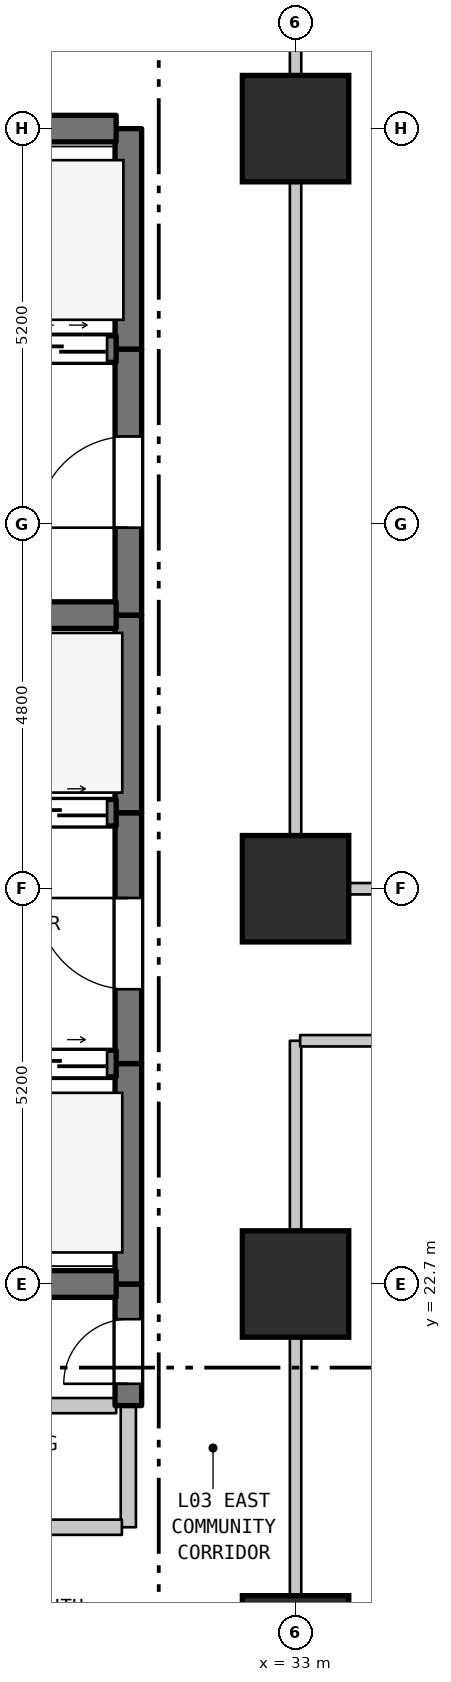
"""IFC4 building model, lengths in metres.
Left out: names, types, materials, properties, quantities, classifications, styles, units other than length and angle.
Written with IfcOpenShell. Run it as: python <this file> out.ifc"""

import sys

from ifc_helpers import new_model, si_unit, direction, frame, frame_2d, origin, origin_2d, place, context, subcontext, project, spatial, rectangle, extrude, element, fill, save


model = new_model("IFC4")
c1 = context("Model", 3, precision=1e-05, world=origin(), true_north=direction((0.0, 1.0)))
c2 = subcontext(c1, "Body", "Model", "MODEL_VIEW")
j1 = project(units=[si_unit("LENGTHUNIT", "METRE"), si_unit("PLANEANGLEUNIT", "RADIAN")], contexts=[c1])
p1 = place(None, origin())
s1 = spatial("IfcSite", under=j1, at=p1, CompositionType="ELEMENT")
p2 = place(p1, origin())
s2 = spatial("IfcBuilding", under=s1, at=p2, CompositionType="ELEMENT")
p3 = place(p2, frame((0.0, 0.0, 19.0)))
s3 = spatial("IfcBuildingStorey", under=s2, at=p3, CompositionType="ELEMENT", Elevation=19.0)
for number, where, z_axis, x_axis in (
    (1, (33.0, 17.9, 0.0), (0.0, 0.0, 1.0), (1.0, 0.0, 0.0)),
    (2, (33.0, 22.7, 0.0), (0.0, 0.0, 1.0), (1.0, 0.0, 0.0)),
    (3, (33.0, 27.9, 0.0), (0.0, 0.0, 1.0), (1.0, 0.0, 0.0)),
    (4, (33.0, 37.9, 0.0), (0.0, 0.0, 1.0), (1.0, 0.0, 0.0)),
):
    element("IfcColumn", number, at=place(p3, frame(where, z_axis=z_axis, x_axis=x_axis)), inside=s3, PredefinedType="COLUMN", context=c2, shape_type="SweptSolid", body=[
        extrude(rectangle(XDim=1.4, YDim=1.4, at=origin_2d()), origin(), (0.0, 0.0, 1.0), 5.0),
    ])
p4 = place(p3, frame((30.8, 19.5, 0.0), z_axis=(0.0, 0.0, 1.0), x_axis=(0.0, 1.0, 0.0)))
e5 = element("IfcWall", 5, at=p4, inside=s3, PredefinedType="STANDARD", context=c2, shape_type="SweptSolid", body=[
    extrude(rectangle(XDim=1.6, YDim=0.2, at=frame_2d((0.8, 0.0))), origin(), (0.0, 0.0, 1.0), 4.685),
])
p5 = place(p3, frame((30.8, 21.1, 0.0), z_axis=(0.0, 0.0, 1.0), x_axis=(0.0, 1.0, 0.0)))
e6 = element("IfcWall", 6, at=p5, inside=s3, PredefinedType="SHEAR", context=c2, shape_type="SweptSolid", body=[
    extrude(rectangle(XDim=1.6, YDim=0.35, at=frame_2d((0.8, 0.0))), origin(), (0.0, 0.0, 1.0), 4.685),
])
p6 = place(p5, frame((0.287, 0.0, 0.0)))
e7 = element("IfcOpeningElement", 7, at=p6, cuts=e6, PredefinedType="OPENING", context=c2, shape_type="SweptSolid", body=[
    extrude(rectangle(XDim=0.85, YDim=2.1, at=frame_2d((0.425, 1.05))), frame((0.0, 0.185, 0.0), z_axis=(0.0, -1.0, 0.0), x_axis=(1.0, 0.0, 0.0)), (0.0, 0.0, 1.0), 0.37),
])
p7 = place(p3, frame((30.8, 22.7, 0.0), z_axis=(0.0, 0.0, 1.0), x_axis=(0.0, 1.0, 0.0)))
e8 = element("IfcWall", 8, at=p7, inside=s3, PredefinedType="SHEAR", context=c2, shape_type="SweptSolid", body=[
    extrude(rectangle(XDim=2.9, YDim=0.35, at=frame_2d((1.45, 0.0))), origin(), (0.0, 0.0, 1.0), 4.685),
])
p8 = place(p3, frame((30.8, 25.6, 0.0), z_axis=(0.0, 0.0, 1.0), x_axis=(0.0, 1.0, 0.0)))
e9 = element("IfcWall", 9, at=p8, inside=s3, PredefinedType="SHEAR", context=c2, shape_type="SweptSolid", body=[
    extrude(rectangle(XDim=3.3, YDim=0.35, at=frame_2d((1.65, 0.0))), origin(), (0.0, 0.0, 1.0), 4.685),
])
p9 = place(p8, frame((0.978, 0.0, 0.0)))
e10 = element("IfcOpeningElement", 10, at=p9, cuts=e9, PredefinedType="OPENING", context=c2, shape_type="SweptSolid", body=[
    extrude(rectangle(XDim=1.2, YDim=2.2, at=frame_2d((0.6, 1.1))), frame((0.0, 0.185, 0.0), z_axis=(0.0, -1.0, 0.0), x_axis=(1.0, 0.0, 0.0)), (0.0, 0.0, 1.0), 0.37),
])
p10 = place(p3, frame((30.8, 28.9, 0.0), z_axis=(0.0, 0.0, 1.0), x_axis=(0.0, 1.0, 0.0)))
e11 = element("IfcWall", 11, at=p10, inside=s3, PredefinedType="SHEAR", context=c2, shape_type="SweptSolid", body=[
    extrude(rectangle(XDim=2.6, YDim=0.35, at=frame_2d((1.3, 0.0))), origin(), (0.0, 0.0, 1.0), 4.685),
])
p11 = place(p3, frame((30.8, 31.5, 0.0), z_axis=(0.0, 0.0, 1.0), x_axis=(0.0, 1.0, 0.0)))
e12 = element("IfcWall", 12, at=p11, inside=s3, PredefinedType="SHEAR", context=c2, shape_type="SweptSolid", body=[
    extrude(rectangle(XDim=3.5, YDim=0.35, at=frame_2d((1.75, 0.0))), origin(), (0.0, 0.0, 1.0), 4.685),
])
p12 = place(p11, frame((1.15, 0.0, 0.0)))
e13 = element("IfcOpeningElement", 13, at=p12, cuts=e12, PredefinedType="OPENING", context=c2, shape_type="SweptSolid", body=[
    extrude(rectangle(XDim=1.2, YDim=2.2, at=frame_2d((0.6, 1.1))), frame((0.0, 0.185, 0.0), z_axis=(0.0, -1.0, 0.0), x_axis=(1.0, 0.0, 0.0)), (0.0, 0.0, 1.0), 0.37),
])
p13 = place(p3, frame((30.8, 35.0, 0.0), z_axis=(0.0, 0.0, 1.0), x_axis=(0.0, 1.0, 0.0)))
e14 = element("IfcWall", 14, at=p13, inside=s3, PredefinedType="SHEAR", context=c2, shape_type="SweptSolid", body=[
    extrude(rectangle(XDim=2.9, YDim=0.35, at=frame_2d((1.45, 0.0))), origin(), (0.0, 0.0, 1.0), 4.685),
])
p14 = place(p3, frame((33.0, 6.7, 0.0), z_axis=(0.0, 0.0, 1.0), x_axis=(0.0, 1.0, 0.0)))
e15 = element("IfcWall", 15, at=p14, inside=s3, PredefinedType="STANDARD", context=c2, shape_type="SweptSolid", body=[
    extrude(rectangle(XDim=19.2, YDim=0.15, at=frame_2d((9.6, 0.0))), origin(), (0.0, 0.0, 1.0), 4.185),
])
p15 = place(p3, frame((33.0, 27.9, 0.0), z_axis=(0.0, 0.0, 1.0), x_axis=(0.0, 1.0, 0.0)))
e16 = element("IfcWall", 16, at=p15, inside=s3, PredefinedType="STANDARD", context=c2, shape_type="SweptSolid", body=[
    extrude(rectangle(XDim=10.0, YDim=0.15, at=frame_2d((5.0, 0.0))), origin(), (0.0, 0.0, 1.0), 4.185),
])
p16 = place(p3, frame((27.285, 19.5, 0.0), z_axis=(0.0, 0.0, 1.0), x_axis=(1.0, 0.0, 0.0)))
e17 = element("IfcWall", 17, at=p16, inside=s3, PredefinedType="STANDARD", context=c2, shape_type="SweptSolid", body=[
    extrude(rectangle(XDim=3.43, YDim=0.2, at=frame_2d((1.715, 0.0))), origin(), (0.0, 0.0, 1.0), 4.685),
])
p17 = place(p16, frame((1.192, 0.0, 0.0)))
e18 = element("IfcOpeningElement", 18, at=p17, cuts=e17, PredefinedType="OPENING", context=c2, shape_type="SweptSolid", body=[
    extrude(rectangle(XDim=0.9, YDim=2.15, at=frame_2d((0.45, 1.075))), frame((0.0, 0.11, 0.0), z_axis=(0.0, -1.0, 0.0), x_axis=(1.0, 0.0, 0.0)), (0.0, 0.0, 1.0), 0.22),
])
p18 = place(p3, frame((27.285, 21.1, 0.0), z_axis=(0.0, 0.0, 1.0), x_axis=(1.0, 0.0, 0.0)))
e19 = element("IfcWall", 19, at=p18, inside=s3, PredefinedType="STANDARD", context=c2, shape_type="SweptSolid", body=[
    extrude(rectangle(XDim=3.355, YDim=0.2, at=frame_2d((1.677, 0.0))), origin(), (0.0, 0.0, 1.0), 4.685),
])
p19 = place(p3, frame((27.46, 22.7, 0.0), z_axis=(0.0, 0.0, 1.0), x_axis=(1.0, 0.0, 0.0)))
e20 = element("IfcWall", 20, at=p19, inside=s3, PredefinedType="SHEAR", context=c2, shape_type="SweptSolid", body=[
    extrude(rectangle(XDim=3.18, YDim=0.35, at=frame_2d((1.59, 0.0))), origin(), (0.0, 0.0, 1.0), 4.685),
])
p20 = place(p3, frame((27.46, 25.6, 0.0), z_axis=(0.0, 0.0, 1.0), x_axis=(1.0, 0.0, 0.0)))
e21 = element("IfcWall", 21, at=p20, inside=s3, PredefinedType="SHEAR", context=c2, shape_type="SweptSolid", body=[
    extrude(rectangle(XDim=3.18, YDim=0.35, at=frame_2d((1.59, 0.0))), origin(), (0.0, 0.0, 1.0), 4.685),
])
p21 = place(p20, frame((0.12, 0.0, 0.0)))
e22 = element("IfcOpeningElement", 22, at=p21, cuts=e21, PredefinedType="OPENING", context=c2, shape_type="SweptSolid", body=[
    extrude(rectangle(XDim=1.25, YDim=2.2, at=frame_2d((0.625, 1.1))), frame((0.0, 0.185, 0.0), z_axis=(0.0, -1.0, 0.0), x_axis=(1.0, 0.0, 0.0)), (0.0, 0.0, 1.0), 0.37),
])
p22 = place(p20, frame((1.81, 0.0, 0.0)))
e23 = element("IfcOpeningElement", 23, at=p22, cuts=e21, PredefinedType="OPENING", context=c2, shape_type="SweptSolid", body=[
    extrude(rectangle(XDim=1.25, YDim=2.2, at=frame_2d((0.625, 1.1))), frame((0.0, 0.185, 0.0), z_axis=(0.0, -1.0, 0.0), x_axis=(1.0, 0.0, 0.0)), (0.0, 0.0, 1.0), 0.37),
])
p23 = place(p3, frame((33.06, 25.9, 0.0), z_axis=(0.0, 0.0, 1.0), x_axis=(1.0, 0.0, 0.0)))
e24 = element("IfcWall", 24, at=p23, inside=s3, PredefinedType="STANDARD", context=c2, shape_type="SweptSolid", body=[
    extrude(rectangle(XDim=23.94, YDim=0.15, at=frame_2d((11.97, 0.0))), origin(), (0.0, 0.0, 1.0), 4.685),
])
p24 = place(p23, frame((8.77, 0.0, 0.0)))
e25 = element("IfcOpeningElement", 25, at=p24, cuts=e24, PredefinedType="OPENING", context=c2, shape_type="SweptSolid", body=[
    extrude(rectangle(XDim=1.2, YDim=2.2, at=frame_2d((0.6, 1.1))), frame((0.0, 0.085, 0.0), z_axis=(0.0, -1.0, 0.0), x_axis=(1.0, 0.0, 0.0)), (0.0, 0.0, 1.0), 0.17),
])
p25 = place(p3, frame((33.06, 27.9, 0.0), z_axis=(0.0, 0.0, 1.0), x_axis=(1.0, 0.0, 0.0)))
e26 = element("IfcWall", 26, at=p25, inside=s3, PredefinedType="STANDARD", context=c2, shape_type="SweptSolid", body=[
    extrude(rectangle(XDim=23.94, YDim=0.15, at=frame_2d((11.97, 0.0))), origin(), (0.0, 0.0, 1.0), 4.185),
])
p26 = place(p25, frame((8.94, 0.0, 0.0)))
e27 = element("IfcOpeningElement", 27, at=p26, cuts=e26, PredefinedType="OPENING", context=c2, shape_type="SweptSolid", body=[
    extrude(rectangle(XDim=1.0, YDim=2.15, at=frame_2d((0.5, 1.075))), frame((0.0, 0.085, 0.0), z_axis=(0.0, -1.0, 0.0), x_axis=(1.0, 0.0, 0.0)), (0.0, 0.0, 1.0), 0.17),
])
p27 = place(p3, frame((27.46, 28.9, 0.0), z_axis=(0.0, 0.0, 1.0), x_axis=(1.0, 0.0, 0.0)))
e28 = element("IfcWall", 28, at=p27, inside=s3, PredefinedType="SHEAR", context=c2, shape_type="SweptSolid", body=[
    extrude(rectangle(XDim=3.18, YDim=0.35, at=frame_2d((1.59, 0.0))), origin(), (0.0, 0.0, 1.0), 4.685),
])
p28 = place(p27, frame((0.12, 0.0, 0.0)))
e29 = element("IfcOpeningElement", 29, at=p28, cuts=e28, PredefinedType="OPENING", context=c2, shape_type="SweptSolid", body=[
    extrude(rectangle(XDim=1.25, YDim=2.2, at=frame_2d((0.625, 1.1))), frame((0.0, 0.185, 0.0), z_axis=(0.0, -1.0, 0.0), x_axis=(1.0, 0.0, 0.0)), (0.0, 0.0, 1.0), 0.37),
])
p29 = place(p27, frame((1.81, 0.0, 0.0)))
e30 = element("IfcOpeningElement", 30, at=p29, cuts=e28, PredefinedType="OPENING", context=c2, shape_type="SweptSolid", body=[
    extrude(rectangle(XDim=1.25, YDim=2.2, at=frame_2d((0.625, 1.1))), frame((0.0, 0.185, 0.0), z_axis=(0.0, -1.0, 0.0), x_axis=(1.0, 0.0, 0.0)), (0.0, 0.0, 1.0), 0.37),
])
p30 = place(p3, frame((27.46, 31.5, 0.0), z_axis=(0.0, 0.0, 1.0), x_axis=(1.0, 0.0, 0.0)))
e31 = element("IfcWall", 31, at=p30, inside=s3, PredefinedType="SHEAR", context=c2, shape_type="SweptSolid", body=[
    extrude(rectangle(XDim=3.18, YDim=0.35, at=frame_2d((1.59, 0.0))), origin(), (0.0, 0.0, 1.0), 4.685),
])
p31 = place(p3, frame((19.16, 35.0, 0.0), z_axis=(0.0, 0.0, 1.0), x_axis=(1.0, 0.0, 0.0)))
e32 = element("IfcWall", 32, at=p31, inside=s3, PredefinedType="SHEAR", context=c2, shape_type="SweptSolid", body=[
    extrude(rectangle(XDim=11.48, YDim=0.35, at=frame_2d((5.74, 0.0))), origin(), (0.0, 0.0, 1.0), 4.685),
])
p32 = place(p31, frame((0.365, 0.0, 0.0)))
e33 = element("IfcOpeningElement", 33, at=p32, cuts=e32, PredefinedType="OPENING", context=c2, shape_type="SweptSolid", body=[
    extrude(rectangle(XDim=1.35, YDim=2.2, at=frame_2d((0.675, 1.1))), frame((0.0, 0.185, 0.0), z_axis=(0.0, -1.0, 0.0), x_axis=(1.0, 0.0, 0.0)), (0.0, 0.0, 1.0), 0.37),
])
p33 = place(p31, frame((2.765, 0.0, 0.0)))
e34 = element("IfcOpeningElement", 34, at=p33, cuts=e32, PredefinedType="OPENING", context=c2, shape_type="SweptSolid", body=[
    extrude(rectangle(XDim=1.35, YDim=2.2, at=frame_2d((0.675, 1.1))), frame((0.0, 0.185, 0.0), z_axis=(0.0, -1.0, 0.0), x_axis=(1.0, 0.0, 0.0)), (0.0, 0.0, 1.0), 0.37),
])
p34 = place(p31, frame((4.915, 0.0, 0.0)))
e35 = element("IfcOpeningElement", 35, at=p34, cuts=e32, PredefinedType="OPENING", context=c2, shape_type="SweptSolid", body=[
    extrude(rectangle(XDim=1.2, YDim=2.2, at=frame_2d((0.6, 1.1))), frame((0.0, 0.185, 0.0), z_axis=(0.0, -1.0, 0.0), x_axis=(1.0, 0.0, 0.0)), (0.0, 0.0, 1.0), 0.37),
])
p35 = place(p31, frame((6.665, 0.0, 0.0)))
e36 = element("IfcOpeningElement", 36, at=p35, cuts=e32, PredefinedType="OPENING", context=c2, shape_type="SweptSolid", body=[
    extrude(rectangle(XDim=1.2, YDim=2.2, at=frame_2d((0.6, 1.1))), frame((0.0, 0.185, 0.0), z_axis=(0.0, -1.0, 0.0), x_axis=(1.0, 0.0, 0.0)), (0.0, 0.0, 1.0), 0.37),
])
p36 = place(p31, frame((8.415, 0.0, 0.0)))
e37 = element("IfcOpeningElement", 37, at=p36, cuts=e32, PredefinedType="OPENING", context=c2, shape_type="SweptSolid", body=[
    extrude(rectangle(XDim=1.2, YDim=2.2, at=frame_2d((0.6, 1.1))), frame((0.0, 0.185, 0.0), z_axis=(0.0, -1.0, 0.0), x_axis=(1.0, 0.0, 0.0)), (0.0, 0.0, 1.0), 0.37),
])
p37 = place(p31, frame((10.16, 0.0, 0.0)))
e38 = element("IfcOpeningElement", 38, at=p37, cuts=e32, PredefinedType="OPENING", context=c2, shape_type="SweptSolid", body=[
    extrude(rectangle(XDim=1.2, YDim=2.2, at=frame_2d((0.6, 1.1))), frame((0.0, 0.185, 0.0), z_axis=(0.0, -1.0, 0.0), x_axis=(1.0, 0.0, 0.0)), (0.0, 0.0, 1.0), 0.37),
])
p38 = place(p3, frame((19.16, 37.9, 0.0), z_axis=(0.0, 0.0, 1.0), x_axis=(1.0, 0.0, 0.0)))
e39 = element("IfcWall", 39, at=p38, inside=s3, PredefinedType="SHEAR", context=c2, shape_type="SweptSolid", body=[
    extrude(rectangle(XDim=11.48, YDim=0.35, at=frame_2d((5.74, 0.0))), origin(), (0.0, 0.0, 1.0), 4.685),
])
p39 = place(p3, frame((33.0, 37.9, 0.0), z_axis=(0.0, 0.0, 1.0), x_axis=(0.0, 1.0, 0.0)))
e40 = element("IfcWall", 40, at=p39, inside=s3, PredefinedType="STANDARD", context=c2, shape_type="SweptSolid", body=[
    extrude(rectangle(XDim=2.4, YDim=0.15, at=frame_2d((1.2, 0.0))), origin(), (0.0, 0.0, 1.0), 4.085),
])
p40 = place(p6, origin())
e41 = element("IfcDoor", 41, at=p40, inside=s3, OperationType="SINGLE_SWING_LEFT", PredefinedType="DOOR", context=c2, shape_type="SweptSolid", body=[
    extrude(rectangle(XDim=0.85, YDim=2.1, at=frame_2d((0.425, 1.05))), frame((0.0, 0.025, 0.0), z_axis=(0.0, -1.0, 0.0), x_axis=(1.0, 0.0, 0.0)), (0.0, 0.0, 1.0), 0.05),
])
fill(e7, e41)
p41 = place(p9, origin())
e42 = element("IfcDoor", 42, at=p41, inside=s3, OperationType="SINGLE_SWING_RIGHT", PredefinedType="DOOR", context=c2, shape_type="SweptSolid", body=[
    extrude(rectangle(XDim=1.2, YDim=2.2, at=frame_2d((0.6, 1.1))), frame((0.0, 0.025, 0.0), z_axis=(0.0, -1.0, 0.0), x_axis=(1.0, 0.0, 0.0)), (0.0, 0.0, 1.0), 0.05),
])
fill(e10, e42)
p42 = place(p12, origin())
e43 = element("IfcDoor", 43, at=p42, inside=s3, OperationType="SINGLE_SWING_LEFT", PredefinedType="DOOR", context=c2, shape_type="SweptSolid", body=[
    extrude(rectangle(XDim=1.2, YDim=2.2, at=frame_2d((0.6, 1.1))), frame((0.0, 0.025, 0.0), z_axis=(0.0, -1.0, 0.0), x_axis=(1.0, 0.0, 0.0)), (0.0, 0.0, 1.0), 0.05),
])
fill(e13, e43)
p43 = place(p22, origin())
e44 = element("IfcDoor", 44, at=p43, inside=s3, OperationType="DOUBLE_DOOR_SLIDING", PredefinedType="DOOR", context=c2, shape_type="SweptSolid", body=[
    extrude(rectangle(XDim=1.25, YDim=2.2, at=frame_2d((0.625, 1.1))), frame((0.0, 0.025, 0.0), z_axis=(0.0, -1.0, 0.0), x_axis=(1.0, 0.0, 0.0)), (0.0, 0.0, 1.0), 0.05),
])
fill(e23, e44)
p44 = place(p29, origin())
e45 = element("IfcDoor", 45, at=p44, inside=s3, OperationType="DOUBLE_DOOR_SLIDING", PredefinedType="DOOR", context=c2, shape_type="SweptSolid", body=[
    extrude(rectangle(XDim=1.25, YDim=2.2, at=frame_2d((0.625, 1.1))), frame((0.0, 0.025, 0.0), z_axis=(0.0, -1.0, 0.0), x_axis=(1.0, 0.0, 0.0)), (0.0, 0.0, 1.0), 0.05),
])
fill(e30, e45)
p45 = place(p37, origin())
e46 = element("IfcDoor", 46, at=p45, inside=s3, OperationType="DOUBLE_DOOR_SLIDING", PredefinedType="DOOR", context=c2, shape_type="SweptSolid", body=[
    extrude(rectangle(XDim=1.2, YDim=2.2, at=frame_2d((0.6, 1.1))), frame((0.0, 0.025, 0.0), z_axis=(0.0, -1.0, 0.0), x_axis=(1.0, 0.0, 0.0)), (0.0, 0.0, 1.0), 0.05),
])
fill(e38, e46)
save(model, sys.argv[1])
